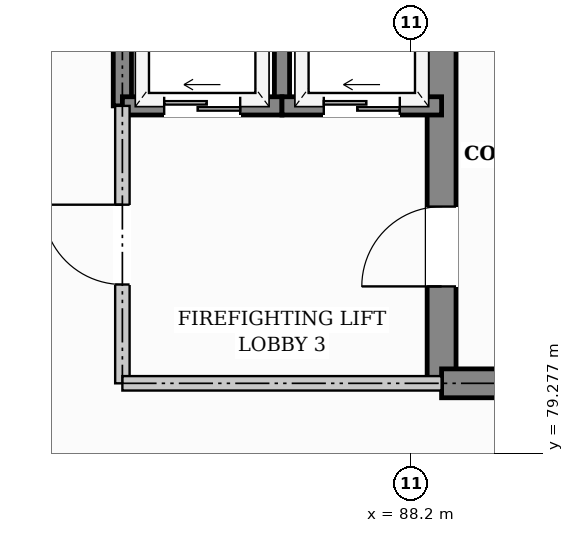
"""IFC4 building model, lengths in metres.
Left out: names, types, materials, properties, quantities, classifications, styles, units other than length and angle.
Written with IfcOpenShell. Run it as: python <this file> out.ifc"""

import sys

from ifc_helpers import new_model, si_unit, direction, frame, frame_2d, origin, place, context, subcontext, project, spatial, rectangle, extrude, element, fill, save


model = new_model("IFC4")
c1 = context("Model", 3, precision=1e-05, world=origin(), true_north=direction((0.0, 1.0)))
c2 = subcontext(c1, "Body", "Model", "MODEL_VIEW")
j1 = project(units=[si_unit("LENGTHUNIT", "METRE"), si_unit("PLANEANGLEUNIT", "RADIAN")], contexts=[c1])
p1 = place(None, origin())
s1 = spatial("IfcSite", under=j1, at=p1, CompositionType="ELEMENT")
p2 = place(p1, origin())
s2 = spatial("IfcBuilding", under=s1, at=p2, CompositionType="ELEMENT")
p3 = place(p2, frame((0.0, 0.0, 5.1)))
s3 = spatial("IfcBuildingStorey", under=s2, at=p3, CompositionType="ELEMENT", Elevation=5.1)
p4 = place(p3, frame((88.6, 80.2, 0.0), z_axis=(0.0, 0.0, 1.0), x_axis=(0.0, 1.0, 0.0)))
e1 = element("IfcWall", 1, at=p4, inside=s3, PredefinedType="SHEAR", context=c2, shape_type="SweptSolid", body=[
    extrude(rectangle(XDim=6.0, YDim=0.38, at=frame_2d((3.0, 0.0))), origin(), (0.0, 0.0, 1.0), 4.18),
])
p5 = place(p4, frame((1.275, 0.0, 0.0)))
e2 = element("IfcOpeningElement", 2, at=p5, cuts=e1, PredefinedType="OPENING", context=c2, shape_type="SweptSolid", body=[
    extrude(rectangle(XDim=1.05, YDim=2.15, at=frame_2d((0.525, 1.075))), frame((0.0, 0.2, 0.0), z_axis=(0.0, -1.0, 0.0), x_axis=(1.0, 0.0, 0.0)), (0.0, 0.0, 1.0), 0.4),
])
p6 = place(p3, frame((88.6, 80.2, 0.0), z_axis=(0.0, 0.0, 1.0), x_axis=(1.0, 0.0, 0.0)))
e3 = element("IfcWall", 3, at=p6, inside=s3, PredefinedType="SHEAR", context=c2, shape_type="SweptSolid", body=[
    extrude(rectangle(XDim=7.0, YDim=0.38, at=frame_2d((3.5, 0.0))), origin(), (0.0, 0.0, 1.0), 4.18),
])
p7 = place(p3, frame((84.4, 83.85, 0.0), z_axis=(0.0, 0.0, 1.0), x_axis=(0.0, 1.0, 0.0)))
e4 = element("IfcWall", 4, at=p7, inside=s3, PredefinedType="SHEAR", context=c2, shape_type="SweptSolid", body=[
    extrude(rectangle(XDim=2.35, YDim=0.24, at=frame_2d((1.175, 0.0))), origin(), (0.0, 0.0, 1.0), 4.18),
])
p8 = place(p3, frame((86.5, 83.85, 0.0), z_axis=(0.0, 0.0, 1.0), x_axis=(0.0, 1.0, 0.0)))
e5 = element("IfcWall", 5, at=p8, inside=s3, PredefinedType="SHEAR", context=c2, shape_type="SweptSolid", body=[
    extrude(rectangle(XDim=2.35, YDim=0.2, at=frame_2d((1.175, 0.0))), origin(), (0.0, 0.0, 1.0), 4.18),
])
p9 = place(p3, frame((84.4, 83.85, 0.0), z_axis=(0.0, 0.0, 1.0), x_axis=(1.0, 0.0, 0.0)))
e6 = element("IfcWall", 6, at=p9, inside=s3, PredefinedType="SHEAR", context=c2, shape_type="SweptSolid", body=[
    extrude(rectangle(XDim=2.1, YDim=0.24, at=frame_2d((1.05, 0.0))), origin(), (0.0, 0.0, 1.0), 4.18),
])
p10 = place(p9, frame((0.55, 0.0, 0.0)))
e7 = element("IfcOpeningElement", 7, at=p10, cuts=e6, PredefinedType="OPENING", context=c2, shape_type="SweptSolid", body=[
    extrude(rectangle(XDim=1.0, YDim=2.1, at=frame_2d((0.5, 1.05))), frame((0.0, 0.13, 0.0), z_axis=(0.0, -1.0, 0.0), x_axis=(1.0, 0.0, 0.0)), (0.0, 0.0, 1.0), 0.26),
])
p11 = place(p3, frame((86.5, 83.85, 0.0), z_axis=(0.0, 0.0, 1.0), x_axis=(1.0, 0.0, 0.0)))
e8 = element("IfcWall", 8, at=p11, inside=s3, PredefinedType="SHEAR", context=c2, shape_type="SweptSolid", body=[
    extrude(rectangle(XDim=2.1, YDim=0.24, at=frame_2d((1.05, 0.0))), origin(), (0.0, 0.0, 1.0), 4.18),
])
p12 = place(p11, frame((0.55, 0.0, 0.0)))
e9 = element("IfcOpeningElement", 9, at=p12, cuts=e8, PredefinedType="OPENING", context=c2, shape_type="SweptSolid", body=[
    extrude(rectangle(XDim=1.0, YDim=2.1, at=frame_2d((0.5, 1.05))), frame((0.0, 0.13, 0.0), z_axis=(0.0, -1.0, 0.0), x_axis=(1.0, 0.0, 0.0)), (0.0, 0.0, 1.0), 0.26),
])
p13 = place(p3, frame((84.4, 80.2, 0.0), z_axis=(0.0, 0.0, 1.0), x_axis=(0.0, 1.0, 0.0)))
e10 = element("IfcWall", 10, at=p13, inside=s3, PredefinedType="PARTITIONING", context=c2, shape_type="SweptSolid", body=[
    extrude(rectangle(XDim=3.65, YDim=0.19, at=frame_2d((1.825, 0.0))), origin(), (0.0, 0.0, 1.0), 4.18),
])
p14 = place(p13, frame((1.3, 0.0, 0.0)))
e11 = element("IfcOpeningElement", 11, at=p14, cuts=e10, PredefinedType="OPENING", context=c2, shape_type="SweptSolid", body=[
    extrude(rectangle(XDim=1.05, YDim=2.15, at=frame_2d((0.525, 1.075))), frame((0.0, 0.105, 0.0), z_axis=(0.0, -1.0, 0.0), x_axis=(1.0, 0.0, 0.0)), (0.0, 0.0, 1.0), 0.21),
])
p15 = place(p3, frame((84.4, 80.2, 0.0), z_axis=(0.0, 0.0, 1.0), x_axis=(1.0, 0.0, 0.0)))
e12 = element("IfcWall", 12, at=p15, inside=s3, PredefinedType="PARTITIONING", context=c2, shape_type="SweptSolid", body=[
    extrude(rectangle(XDim=4.2, YDim=0.19, at=frame_2d((2.1, 0.0))), origin(), (0.0, 0.0, 1.0), 4.18),
])
p16 = place(p5, origin())
e13 = element("IfcDoor", 13, at=p16, inside=s3, OperationType="SINGLE_SWING_LEFT", PredefinedType="DOOR", context=c2, shape_type="SweptSolid", body=[
    extrude(rectangle(XDim=1.05, YDim=2.15, at=frame_2d((0.525, 1.075))), frame((0.0, 0.025, 0.0), z_axis=(0.0, -1.0, 0.0), x_axis=(1.0, 0.0, 0.0)), (0.0, 0.0, 1.0), 0.05),
])
fill(e2, e13)
p17 = place(p10, origin())
e14 = element("IfcDoor", 14, at=p17, inside=s3, OperationType="SLIDING_TO_LEFT", PredefinedType="DOOR", context=c2, shape_type="SweptSolid", body=[
    extrude(rectangle(XDim=1.0, YDim=2.1, at=frame_2d((0.5, 1.05))), frame((0.0, 0.025, 0.0), z_axis=(0.0, -1.0, 0.0), x_axis=(1.0, 0.0, 0.0)), (0.0, 0.0, 1.0), 0.05),
])
fill(e7, e14)
p18 = place(p12, origin())
e15 = element("IfcDoor", 15, at=p18, inside=s3, OperationType="SLIDING_TO_LEFT", PredefinedType="DOOR", context=c2, shape_type="SweptSolid", body=[
    extrude(rectangle(XDim=1.0, YDim=2.1, at=frame_2d((0.5, 1.05))), frame((0.0, 0.025, 0.0), z_axis=(0.0, -1.0, 0.0), x_axis=(1.0, 0.0, 0.0)), (0.0, 0.0, 1.0), 0.05),
])
fill(e9, e15)
p19 = place(p14, origin())
e16 = element("IfcDoor", 16, at=p19, inside=s3, OperationType="SINGLE_SWING_RIGHT", PredefinedType="DOOR", context=c2, shape_type="SweptSolid", body=[
    extrude(rectangle(XDim=1.05, YDim=2.15, at=frame_2d((0.525, 1.075))), frame((0.0, 0.025, 0.0), z_axis=(0.0, -1.0, 0.0), x_axis=(1.0, 0.0, 0.0)), (0.0, 0.0, 1.0), 0.05),
])
fill(e11, e16)
save(model, sys.argv[1])
